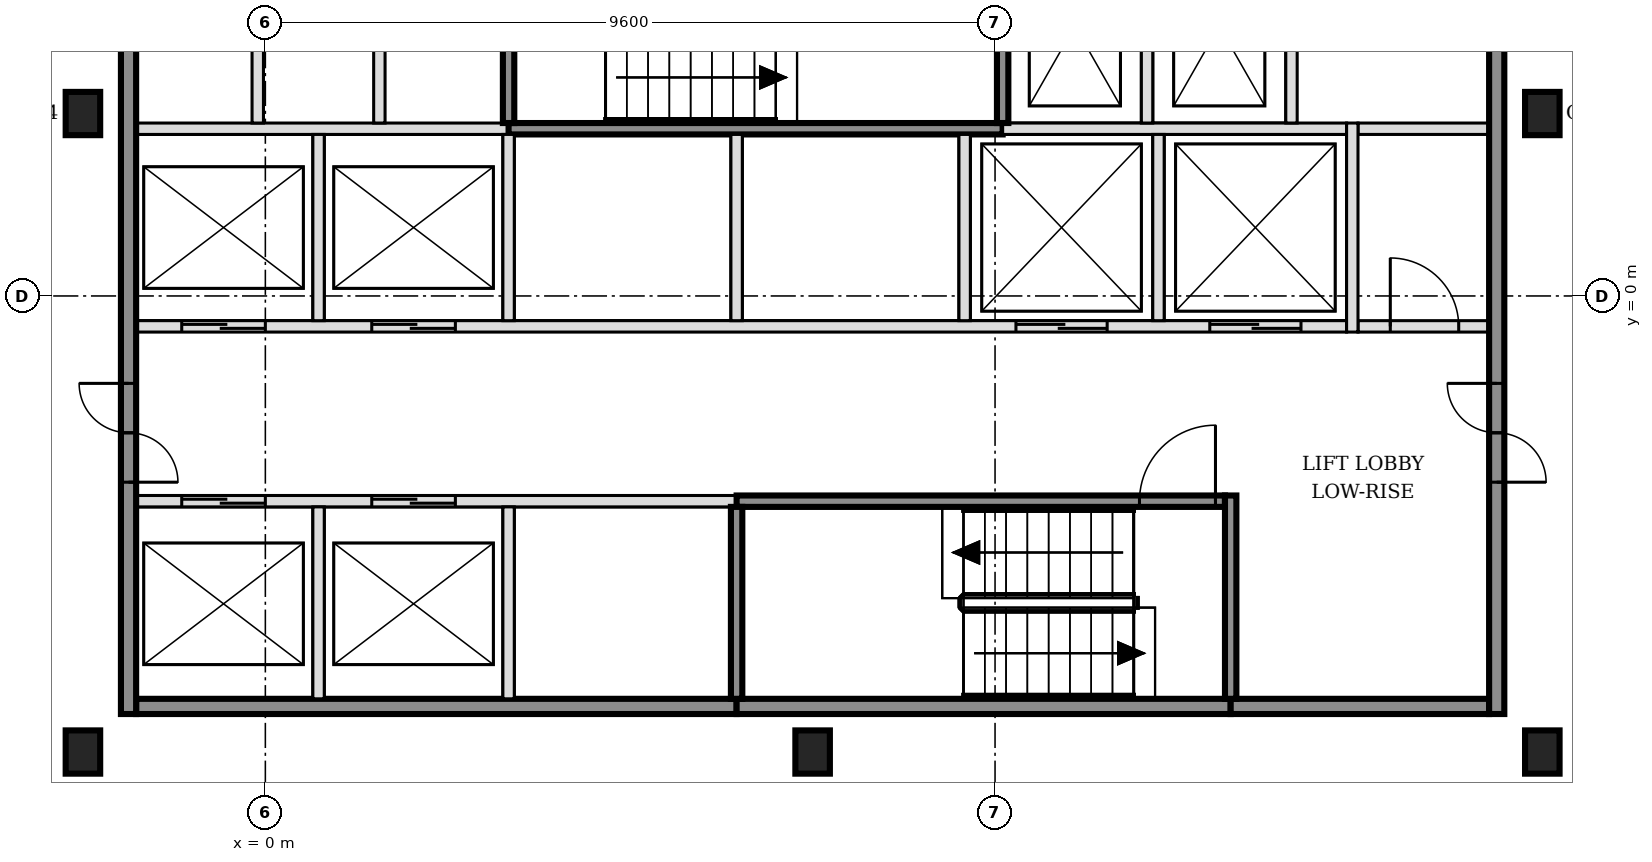
"""IFC4 building model, lengths in metres.
Left out: names, types, materials, properties, quantities, classifications, styles, units other than length and angle.
Written with IfcOpenShell. Run it as: python <this file> out.ifc"""

import sys

from ifc_helpers import new_model, si_unit, direction, frame, frame_2d, origin, origin_2d, place, context, subcontext, project, spatial, rectangle, i_section, extrude, element, fill, save


model = new_model("IFC4")
c1 = context("Model", 3, precision=1e-05, world=origin(), true_north=direction((0.0, 1.0)))
c2 = subcontext(c1, "Body", "Model", "MODEL_VIEW")
j1 = project(units=[si_unit("LENGTHUNIT", "METRE"), si_unit("PLANEANGLEUNIT", "RADIAN")], contexts=[c1])
p1 = place(None, origin())
s1 = spatial("IfcSite", under=j1, at=p1, CompositionType="ELEMENT")
p2 = place(p1, origin())
s2 = spatial("IfcBuilding", under=s1, at=p2, CompositionType="ELEMENT")
p3 = place(p2, frame((0.0, 0.0, 9.0)))
s3 = spatial("IfcBuildingStorey", under=s2, at=p3, CompositionType="ELEMENT", Elevation=9.0)
for number, where, z_axis, x_axis in (
    (1, (-2.4, -6.0, -0.2), (0.0, 0.0, 1.0), (1.0, 0.0, 0.0)),
    (2, (7.2, -6.0, -0.2), (0.0, 0.0, 1.0), (1.0, 0.0, 0.0)),
    (3, (16.8, -6.0, -0.2), (0.0, 0.0, 1.0), (1.0, 0.0, 0.0)),
    (4, (-2.4, 2.4, -0.2), (0.0, 0.0, 1.0), (1.0, 0.0, 0.0)),
    (5, (16.8, 2.4, -0.2), (0.0, 0.0, 1.0), (1.0, 0.0, 0.0)),
):
    element("IfcColumn", number, at=place(p3, frame(where, z_axis=z_axis, x_axis=x_axis)), inside=s3, PredefinedType="COLUMN", context=c2, shape_type="SweptSolid", body=[
        extrude(i_section(OverallWidth=0.454, OverallDepth=0.569, WebThickness=0.078, FlangeThickness=0.125, FilletRadius=0.015, at=origin_2d()), origin(), (0.0, 0.0, 1.0), 6.0),
    ])
p4 = place(p3, frame((-1.7, -5.4, 0.0), z_axis=(0.0, 0.0, 1.0), x_axis=(1.0, 0.0, 0.0)))
e6 = element("IfcWall", 6, at=p4, inside=s3, PredefinedType="SOLIDWALL", context=c2, shape_type="SweptSolid", body=[
    extrude(rectangle(XDim=7.9, YDim=0.2, at=frame_2d((3.95, 0.0))), origin(), (0.0, 0.0, 1.0), 5.8),
])
p5 = place(p3, frame((6.2, -5.4, 0.0), z_axis=(0.0, 0.0, 1.0), x_axis=(1.0, 0.0, 0.0)))
e7 = element("IfcWall", 7, at=p5, inside=s3, PredefinedType="SOLIDWALL", context=c2, shape_type="SweptSolid", body=[
    extrude(rectangle(XDim=6.5, YDim=0.2, at=frame_2d((3.25, 0.0))), origin(), (0.0, 0.0, 1.0), 5.8),
])
p6 = place(p3, frame((12.7, -5.4, 0.0), z_axis=(0.0, 0.0, 1.0), x_axis=(1.0, 0.0, 0.0)))
e8 = element("IfcWall", 8, at=p6, inside=s3, PredefinedType="SOLIDWALL", context=c2, shape_type="SweptSolid", body=[
    extrude(rectangle(XDim=3.4, YDim=0.2, at=frame_2d((1.7, 0.0))), origin(), (0.0, 0.0, 1.0), 5.8),
])
p7 = place(p3, frame((-1.7, -2.7, 0.0), z_axis=(0.0, 0.0, 1.0), x_axis=(1.0, 0.0, 0.0)))
e9 = element("IfcWall", 9, at=p7, inside=s3, PredefinedType="SOLIDWALL", context=c2, shape_type="SweptSolid", body=[
    extrude(rectangle(XDim=7.9, YDim=0.15, at=frame_2d((3.95, 0.0))), origin(), (0.0, 0.0, 1.0), 5.8),
])
p8 = place(p7, frame((0.6, 0.0, 0.0)))
e10 = element("IfcOpeningElement", 10, at=p8, cuts=e9, PredefinedType="OPENING", context=c2, shape_type="SweptSolid", body=[
    extrude(rectangle(XDim=1.1, YDim=2.1, at=frame_2d((0.55, 1.05))), frame((0.0, 0.085, 0.0), z_axis=(0.0, -1.0, 0.0), x_axis=(1.0, 0.0, 0.0)), (0.0, 0.0, 1.0), 0.17),
])
p9 = place(p7, frame((3.1, 0.0, 0.0)))
e11 = element("IfcOpeningElement", 11, at=p9, cuts=e9, PredefinedType="OPENING", context=c2, shape_type="SweptSolid", body=[
    extrude(rectangle(XDim=1.1, YDim=2.1, at=frame_2d((0.55, 1.05))), frame((0.0, 0.085, 0.0), z_axis=(0.0, -1.0, 0.0), x_axis=(1.0, 0.0, 0.0)), (0.0, 0.0, 1.0), 0.17),
])
p10 = place(p3, frame((6.2, -2.7, 0.0), z_axis=(0.0, 0.0, 1.0), x_axis=(1.0, 0.0, 0.0)))
e12 = element("IfcWall", 12, at=p10, inside=s3, PredefinedType="SOLIDWALL", context=c2, shape_type="SweptSolid", body=[
    extrude(rectangle(XDim=6.425, YDim=0.15, at=frame_2d((3.212, 0.0))), origin(), (0.0, 0.0, 1.0), 5.8),
])
p11 = place(p10, frame((5.3, 0.0, 0.0)))
e13 = element("IfcOpeningElement", 13, at=p11, cuts=e12, PredefinedType="OPENING", context=c2, shape_type="SweptSolid", body=[
    extrude(rectangle(XDim=1.0, YDim=2.1, at=frame_2d((0.5, 1.05))), frame((0.0, 0.085, 0.0), z_axis=(0.0, -1.0, 0.0), x_axis=(1.0, 0.0, 0.0)), (0.0, 0.0, 1.0), 0.17),
])
p12 = place(p3, frame((-1.7, -0.4, 0.0), z_axis=(0.0, 0.0, 1.0), x_axis=(1.0, 0.0, 0.0)))
e14 = element("IfcWall", 14, at=p12, inside=s3, PredefinedType="SOLIDWALL", context=c2, shape_type="SweptSolid", body=[
    extrude(rectangle(XDim=15.925, YDim=0.15, at=frame_2d((7.962, 0.0))), origin(), (0.0, 0.0, 1.0), 5.8),
])
p13 = place(p12, frame((0.6, 0.0, 0.0)))
e15 = element("IfcOpeningElement", 15, at=p13, cuts=e14, PredefinedType="OPENING", context=c2, shape_type="SweptSolid", body=[
    extrude(rectangle(XDim=1.1, YDim=2.1, at=frame_2d((0.55, 1.05))), frame((0.0, 0.085, 0.0), z_axis=(0.0, -1.0, 0.0), x_axis=(1.0, 0.0, 0.0)), (0.0, 0.0, 1.0), 0.17),
])
p14 = place(p12, frame((3.1, 0.0, 0.0)))
e16 = element("IfcOpeningElement", 16, at=p14, cuts=e14, PredefinedType="OPENING", context=c2, shape_type="SweptSolid", body=[
    extrude(rectangle(XDim=1.1, YDim=2.1, at=frame_2d((0.55, 1.05))), frame((0.0, 0.085, 0.0), z_axis=(0.0, -1.0, 0.0), x_axis=(1.0, 0.0, 0.0)), (0.0, 0.0, 1.0), 0.17),
])
p15 = place(p12, frame((11.575, 0.0, 0.0)))
e17 = element("IfcOpeningElement", 17, at=p15, cuts=e14, PredefinedType="OPENING", context=c2, shape_type="SweptSolid", body=[
    extrude(rectangle(XDim=1.2, YDim=2.1, at=frame_2d((0.6, 1.05))), frame((0.0, 0.085, 0.0), z_axis=(0.0, -1.0, 0.0), x_axis=(1.0, 0.0, 0.0)), (0.0, 0.0, 1.0), 0.17),
])
p16 = place(p12, frame((14.125, 0.0, 0.0)))
e18 = element("IfcOpeningElement", 18, at=p16, cuts=e14, PredefinedType="OPENING", context=c2, shape_type="SweptSolid", body=[
    extrude(rectangle(XDim=1.2, YDim=2.1, at=frame_2d((0.6, 1.05))), frame((0.0, 0.085, 0.0), z_axis=(0.0, -1.0, 0.0), x_axis=(1.0, 0.0, 0.0)), (0.0, 0.0, 1.0), 0.17),
])
p17 = place(p3, frame((14.375, -0.4, 0.0), z_axis=(0.0, 0.0, 1.0), x_axis=(1.0, 0.0, 0.0)))
e19 = element("IfcWall", 19, at=p17, inside=s3, PredefinedType="PARTITIONING", context=c2, shape_type="SweptSolid", body=[
    extrude(rectangle(XDim=1.725, YDim=0.15, at=frame_2d((0.863, 0.0))), origin(), (0.0, 0.0, 1.0), 5.8),
])
p18 = place(p17, frame((0.425, 0.0, 0.0)))
e20 = element("IfcOpeningElement", 20, at=p18, cuts=e19, PredefinedType="OPENING", context=c2, shape_type="SweptSolid", body=[
    extrude(rectangle(XDim=0.9, YDim=2.1, at=frame_2d((0.45, 1.05))), frame((0.0, 0.085, 0.0), z_axis=(0.0, -1.0, 0.0), x_axis=(1.0, 0.0, 0.0)), (0.0, 0.0, 1.0), 0.17),
])
p19 = place(p3, frame((-1.7, 2.2, 0.0), z_axis=(0.0, 0.0, 1.0), x_axis=(1.0, 0.0, 0.0)))
e21 = element("IfcWall", 21, at=p19, inside=s3, PredefinedType="SOLIDWALL", context=c2, shape_type="SweptSolid", body=[
    extrude(rectangle(XDim=4.9, YDim=0.15, at=frame_2d((2.45, 0.0))), origin(), (0.0, 0.0, 1.0), 5.8),
])
p20 = place(p3, frame((3.2, 2.2, 0.0), z_axis=(0.0, 0.0, 1.0), x_axis=(1.0, 0.0, 0.0)))
e22 = element("IfcWall", 22, at=p20, inside=s3, PredefinedType="SOLIDWALL", context=c2, shape_type="SweptSolid", body=[
    extrude(rectangle(XDim=6.5, YDim=0.15, at=frame_2d((3.25, 0.0))), origin(), (0.0, 0.0, 1.0), 5.8),
])
p21 = place(p3, frame((9.7, 2.2, 0.0), z_axis=(0.0, 0.0, 1.0), x_axis=(1.0, 0.0, 0.0)))
e23 = element("IfcWall", 23, at=p21, inside=s3, PredefinedType="SOLIDWALL", context=c2, shape_type="SweptSolid", body=[
    extrude(rectangle(XDim=4.525, YDim=0.15, at=frame_2d((2.263, 0.0))), origin(), (0.0, 0.0, 1.0), 5.8),
])
p22 = place(p3, frame((14.375, 2.2, 0.0), z_axis=(0.0, 0.0, 1.0), x_axis=(1.0, 0.0, 0.0)))
e24 = element("IfcWall", 24, at=p22, inside=s3, PredefinedType="PARTITIONING", context=c2, shape_type="SweptSolid", body=[
    extrude(rectangle(XDim=1.725, YDim=0.15, at=frame_2d((0.863, 0.0))), origin(), (0.0, 0.0, 1.0), 5.8),
])
p23 = place(p3, frame((-1.8, -5.5, 0.0), z_axis=(0.0, 0.0, 1.0), x_axis=(0.0, 1.0, 0.0)))
e25 = element("IfcWall", 25, at=p23, inside=s3, PredefinedType="SOLIDWALL", context=c2, shape_type="SweptSolid", body=[
    extrude(rectangle(XDim=15.8, YDim=0.2, at=frame_2d((7.9, 0.0))), origin(), (0.0, 0.0, 1.0), 5.8),
])
p24 = place(p23, frame((3.05, 0.0, 0.0)))
e26 = element("IfcOpeningElement", 26, at=p24, cuts=e25, PredefinedType="OPENING", context=c2, shape_type="SweptSolid", body=[
    extrude(rectangle(XDim=1.3, YDim=2.1, at=frame_2d((0.65, 1.05))), frame((0.0, 0.11, 0.0), z_axis=(0.0, -1.0, 0.0), x_axis=(1.0, 0.0, 0.0)), (0.0, 0.0, 1.0), 0.22),
])
p25 = place(p23, frame((11.45, 0.0, 0.0)))
e27 = element("IfcOpeningElement", 27, at=p25, cuts=e25, PredefinedType="OPENING", context=c2, shape_type="SweptSolid", body=[
    extrude(rectangle(XDim=1.3, YDim=2.1, at=frame_2d((0.65, 1.05))), frame((0.0, 0.11, 0.0), z_axis=(0.0, -1.0, 0.0), x_axis=(1.0, 0.0, 0.0)), (0.0, 0.0, 1.0), 0.22),
])
p26 = place(p3, frame((-0.1, 2.275, 0.0), z_axis=(0.0, 0.0, 1.0), x_axis=(0.0, 1.0, 0.0)))
e28 = element("IfcWall", 28, at=p26, inside=s3, PredefinedType="PARTITIONING", context=c2, shape_type="SweptSolid", body=[
    extrude(rectangle(XDim=2.55, YDim=0.15, at=frame_2d((1.275, 0.0))), origin(), (0.0, 0.0, 1.0), 5.8),
])
p27 = place(p3, frame((0.7, -5.3, 0.0), z_axis=(0.0, 0.0, 1.0), x_axis=(0.0, 1.0, 0.0)))
e29 = element("IfcWall", 29, at=p27, inside=s3, PredefinedType="SOLIDWALL", context=c2, shape_type="SweptSolid", body=[
    extrude(rectangle(XDim=2.525, YDim=0.15, at=frame_2d((1.263, 0.0))), origin(), (0.0, 0.0, 1.0), 5.8),
])
p28 = place(p3, frame((0.7, -0.325, 0.0), z_axis=(0.0, 0.0, 1.0), x_axis=(0.0, 1.0, 0.0)))
e30 = element("IfcWall", 30, at=p28, inside=s3, PredefinedType="SOLIDWALL", context=c2, shape_type="SweptSolid", body=[
    extrude(rectangle(XDim=2.45, YDim=0.15, at=frame_2d((1.225, 0.0))), origin(), (0.0, 0.0, 1.0), 5.8),
])
p29 = place(p3, frame((1.5, 2.275, 0.0), z_axis=(0.0, 0.0, 1.0), x_axis=(0.0, 1.0, 0.0)))
e31 = element("IfcWall", 31, at=p29, inside=s3, PredefinedType="PARTITIONING", context=c2, shape_type="SweptSolid", body=[
    extrude(rectangle(XDim=2.55, YDim=0.15, at=frame_2d((1.275, 0.0))), origin(), (0.0, 0.0, 1.0), 5.8),
])
p30 = place(p3, frame((3.2, -5.3, 0.0), z_axis=(0.0, 0.0, 1.0), x_axis=(0.0, 1.0, 0.0)))
e32 = element("IfcWall", 32, at=p30, inside=s3, PredefinedType="SOLIDWALL", context=c2, shape_type="SweptSolid", body=[
    extrude(rectangle(XDim=2.525, YDim=0.15, at=frame_2d((1.263, 0.0))), origin(), (0.0, 0.0, 1.0), 5.8),
])
p31 = place(p3, frame((3.2, -0.325, 0.0), z_axis=(0.0, 0.0, 1.0), x_axis=(0.0, 1.0, 0.0)))
e33 = element("IfcWall", 33, at=p31, inside=s3, PredefinedType="SOLIDWALL", context=c2, shape_type="SweptSolid", body=[
    extrude(rectangle(XDim=2.45, YDim=0.15, at=frame_2d((1.225, 0.0))), origin(), (0.0, 0.0, 1.0), 5.8),
])
p32 = place(p3, frame((3.2, 2.275, 0.0), z_axis=(0.0, 0.0, 1.0), x_axis=(0.0, 1.0, 0.0)))
e34 = element("IfcWall", 34, at=p32, inside=s3, PredefinedType="SOLIDWALL", context=c2, shape_type="SweptSolid", body=[
    extrude(rectangle(XDim=2.7, YDim=0.15, at=frame_2d((1.35, 0.0))), origin(), (0.0, 0.0, 1.0), 5.8),
])
p33 = place(p3, frame((6.2, -5.3, 0.0), z_axis=(0.0, 0.0, 1.0), x_axis=(0.0, 1.0, 0.0)))
e35 = element("IfcWall", 35, at=p33, inside=s3, PredefinedType="SOLIDWALL", context=c2, shape_type="SweptSolid", body=[
    extrude(rectangle(XDim=2.525, YDim=0.15, at=frame_2d((1.263, 0.0))), origin(), (0.0, 0.0, 1.0), 5.8),
])
for number, where, z_axis, x_axis in (
    (36, (6.2, -0.325, 0.0), (0.0, 0.0, 1.0), (0.0, 1.0, 0.0)),
    (37, (9.2, -0.325, 0.0), (0.0, 0.0, 1.0), (0.0, 1.0, 0.0)),
):
    element("IfcWall", number, at=place(p3, frame(where, z_axis=z_axis, x_axis=x_axis)), inside=s3, PredefinedType="SOLIDWALL", context=c2, shape_type="SweptSolid", body=[
        extrude(rectangle(XDim=2.45, YDim=0.15, at=frame_2d((1.225, 0.0))), origin(), (0.0, 0.0, 1.0), 5.8),
    ])
for number, where, z_axis, x_axis in (
    (38, (9.7, 2.275, 0.0), (0.0, 0.0, 1.0), (0.0, 1.0, 0.0)),
    (39, (11.6, 2.275, 0.0), (0.0, 0.0, 1.0), (0.0, 1.0, 0.0)),
):
    element("IfcWall", number, at=place(p3, frame(where, z_axis=z_axis, x_axis=x_axis)), inside=s3, PredefinedType="SOLIDWALL", context=c2, shape_type="SweptSolid", body=[
        extrude(rectangle(XDim=2.55, YDim=0.15, at=frame_2d((1.275, 0.0))), origin(), (0.0, 0.0, 1.0), 5.8),
    ])
p34 = place(p3, frame((11.75, -0.325, 0.0), z_axis=(0.0, 0.0, 1.0), x_axis=(0.0, 1.0, 0.0)))
e40 = element("IfcWall", 40, at=p34, inside=s3, PredefinedType="SOLIDWALL", context=c2, shape_type="SweptSolid", body=[
    extrude(rectangle(XDim=2.45, YDim=0.15, at=frame_2d((1.225, 0.0))), origin(), (0.0, 0.0, 1.0), 5.8),
])
p35 = place(p3, frame((12.7, -5.3, 0.0), z_axis=(0.0, 0.0, 1.0), x_axis=(0.0, 1.0, 0.0)))
e41 = element("IfcWall", 41, at=p35, inside=s3, PredefinedType="SOLIDWALL", context=c2, shape_type="SweptSolid", body=[
    extrude(rectangle(XDim=2.675, YDim=0.15, at=frame_2d((1.337, 0.0))), origin(), (0.0, 0.0, 1.0), 5.8),
])
p36 = place(p3, frame((13.5, 2.275, 0.0), z_axis=(0.0, 0.0, 1.0), x_axis=(0.0, 1.0, 0.0)))
e42 = element("IfcWall", 42, at=p36, inside=s3, PredefinedType="SOLIDWALL", context=c2, shape_type="SweptSolid", body=[
    extrude(rectangle(XDim=2.55, YDim=0.15, at=frame_2d((1.275, 0.0))), origin(), (0.0, 0.0, 1.0), 5.8),
])
p37 = place(p3, frame((14.3, -0.475, 0.0), z_axis=(0.0, 0.0, 1.0), x_axis=(0.0, 1.0, 0.0)))
e43 = element("IfcWall", 43, at=p37, inside=s3, PredefinedType="SOLIDWALL", context=c2, shape_type="SweptSolid", body=[
    extrude(rectangle(XDim=2.75, YDim=0.15, at=frame_2d((1.375, 0.0))), origin(), (0.0, 0.0, 1.0), 5.8),
])
p38 = place(p3, frame((16.2, -5.5, 0.0), z_axis=(0.0, 0.0, 1.0), x_axis=(0.0, 1.0, 0.0)))
e44 = element("IfcWall", 44, at=p38, inside=s3, PredefinedType="SOLIDWALL", context=c2, shape_type="SweptSolid", body=[
    extrude(rectangle(XDim=15.8, YDim=0.2, at=frame_2d((7.9, 0.0))), origin(), (0.0, 0.0, 1.0), 5.8),
])
p39 = place(p38, frame((3.05, 0.0, 0.0)))
e45 = element("IfcOpeningElement", 45, at=p39, cuts=e44, PredefinedType="OPENING", context=c2, shape_type="SweptSolid", body=[
    extrude(rectangle(XDim=1.3, YDim=2.1, at=frame_2d((0.65, 1.05))), frame((0.0, 0.11, 0.0), z_axis=(0.0, -1.0, 0.0), x_axis=(1.0, 0.0, 0.0)), (0.0, 0.0, 1.0), 0.22),
])
p40 = place(p38, frame((11.45, 0.0, 0.0)))
e46 = element("IfcOpeningElement", 46, at=p40, cuts=e44, PredefinedType="OPENING", context=c2, shape_type="SweptSolid", body=[
    extrude(rectangle(XDim=1.3, YDim=2.1, at=frame_2d((0.65, 1.05))), frame((0.0, 0.11, 0.0), z_axis=(0.0, -1.0, 0.0), x_axis=(1.0, 0.0, 0.0)), (0.0, 0.0, 1.0), 0.22),
])
p41 = place(p8, origin())
e47 = element("IfcDoor", 47, at=p41, inside=s3, OperationType="DOUBLE_DOOR_SLIDING", PredefinedType="DOOR", context=c2, shape_type="SweptSolid", body=[
    extrude(rectangle(XDim=1.1, YDim=2.1, at=frame_2d((0.55, 1.05))), frame((0.0, 0.025, 0.0), z_axis=(0.0, -1.0, 0.0), x_axis=(1.0, 0.0, 0.0)), (0.0, 0.0, 1.0), 0.05),
])
fill(e10, e47)
p42 = place(p9, origin())
e48 = element("IfcDoor", 48, at=p42, inside=s3, OperationType="DOUBLE_DOOR_SLIDING", PredefinedType="DOOR", context=c2, shape_type="SweptSolid", body=[
    extrude(rectangle(XDim=1.1, YDim=2.1, at=frame_2d((0.55, 1.05))), frame((0.0, 0.025, 0.0), z_axis=(0.0, -1.0, 0.0), x_axis=(1.0, 0.0, 0.0)), (0.0, 0.0, 1.0), 0.05),
])
fill(e11, e48)
p43 = place(p13, origin())
e49 = element("IfcDoor", 49, at=p43, inside=s3, OperationType="DOUBLE_DOOR_SLIDING", PredefinedType="DOOR", context=c2, shape_type="SweptSolid", body=[
    extrude(rectangle(XDim=1.1, YDim=2.1, at=frame_2d((0.55, 1.05))), frame((0.0, 0.025, 0.0), z_axis=(0.0, -1.0, 0.0), x_axis=(1.0, 0.0, 0.0)), (0.0, 0.0, 1.0), 0.05),
])
fill(e15, e49)
p44 = place(p14, origin())
e50 = element("IfcDoor", 50, at=p44, inside=s3, OperationType="DOUBLE_DOOR_SLIDING", PredefinedType="DOOR", context=c2, shape_type="SweptSolid", body=[
    extrude(rectangle(XDim=1.1, YDim=2.1, at=frame_2d((0.55, 1.05))), frame((0.0, 0.025, 0.0), z_axis=(0.0, -1.0, 0.0), x_axis=(1.0, 0.0, 0.0)), (0.0, 0.0, 1.0), 0.05),
])
fill(e16, e50)
p45 = place(p15, origin())
e51 = element("IfcDoor", 51, at=p45, inside=s3, OperationType="DOUBLE_DOOR_SLIDING", PredefinedType="DOOR", context=c2, shape_type="SweptSolid", body=[
    extrude(rectangle(XDim=1.2, YDim=2.1, at=frame_2d((0.6, 1.05))), frame((0.0, 0.025, 0.0), z_axis=(0.0, -1.0, 0.0), x_axis=(1.0, 0.0, 0.0)), (0.0, 0.0, 1.0), 0.05),
])
fill(e17, e51)
p46 = place(p16, origin())
e52 = element("IfcDoor", 52, at=p46, inside=s3, OperationType="DOUBLE_DOOR_SLIDING", PredefinedType="DOOR", context=c2, shape_type="SweptSolid", body=[
    extrude(rectangle(XDim=1.2, YDim=2.1, at=frame_2d((0.6, 1.05))), frame((0.0, 0.025, 0.0), z_axis=(0.0, -1.0, 0.0), x_axis=(1.0, 0.0, 0.0)), (0.0, 0.0, 1.0), 0.05),
])
fill(e18, e52)
p47 = place(p11, origin())
e53 = element("IfcDoor", 53, at=p47, inside=s3, OperationType="SINGLE_SWING_RIGHT", PredefinedType="DOOR", context=c2, shape_type="SweptSolid", body=[
    extrude(rectangle(XDim=1.0, YDim=2.1, at=frame_2d((0.5, 1.05))), frame((0.0, 0.025, 0.0), z_axis=(0.0, -1.0, 0.0), x_axis=(1.0, 0.0, 0.0)), (0.0, 0.0, 1.0), 0.05),
])
fill(e13, e53)
p48 = place(p24, origin())
e54 = element("IfcDoor", 54, at=p48, inside=s3, OperationType="DOUBLE_DOOR_SINGLE_SWING", PredefinedType="DOOR", context=c2, shape_type="SweptSolid", body=[
    extrude(rectangle(XDim=1.3, YDim=2.1, at=frame_2d((0.65, 1.05))), frame((0.0, 0.025, 0.0), z_axis=(0.0, -1.0, 0.0), x_axis=(1.0, 0.0, 0.0)), (0.0, 0.0, 1.0), 0.05),
])
fill(e26, e54)
p49 = place(p39, origin())
e55 = element("IfcDoor", 55, at=p49, inside=s3, OperationType="DOUBLE_DOOR_SINGLE_SWING", PredefinedType="DOOR", context=c2, shape_type="SweptSolid", body=[
    extrude(rectangle(XDim=1.3, YDim=2.1, at=frame_2d((0.65, 1.05))), frame((0.0, 0.025, 0.0), z_axis=(0.0, -1.0, 0.0), x_axis=(1.0, 0.0, 0.0)), (0.0, 0.0, 1.0), 0.05),
])
fill(e45, e55)
p50 = place(p18, origin())
e56 = element("IfcDoor", 56, at=p50, inside=s3, OperationType="SINGLE_SWING_LEFT", PredefinedType="DOOR", context=c2, shape_type="SweptSolid", body=[
    extrude(rectangle(XDim=0.9, YDim=2.1, at=frame_2d((0.45, 1.05))), frame((0.0, 0.025, 0.0), z_axis=(0.0, -1.0, 0.0), x_axis=(1.0, 0.0, 0.0)), (0.0, 0.0, 1.0), 0.05),
])
fill(e20, e56)
save(model, sys.argv[1])
